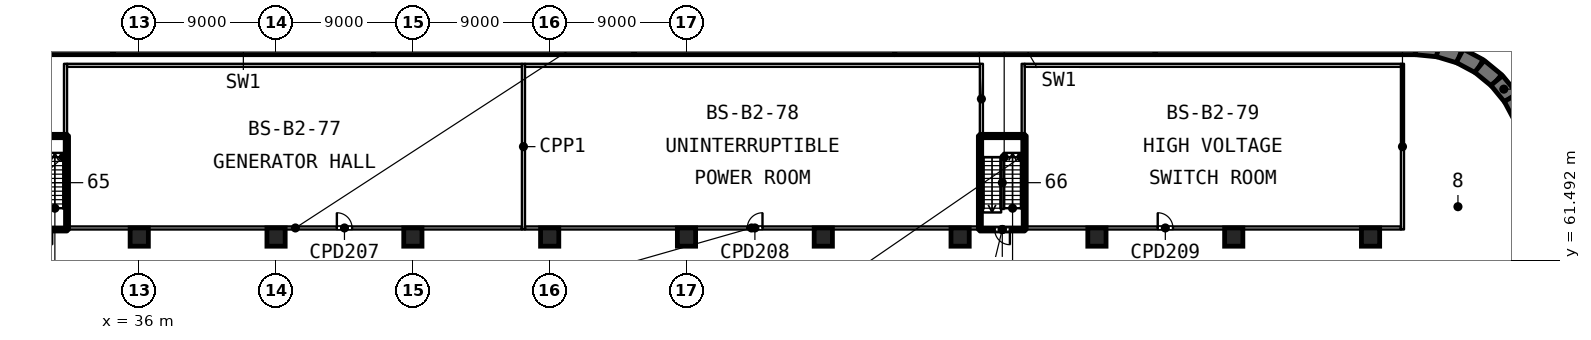
"""IFC4 building model, lengths in metres.
Left out: names, types, materials, properties, quantities, classifications, styles, units other than length and angle.
Written with IfcOpenShell. Run it as: python <this file> out.ifc"""

import sys

from ifc_helpers import new_model, si_unit, direction, frame, frame_2d, origin, origin_2d, place, context, subcontext, project, spatial, rectangle, extrude, element, fill, save


model = new_model("IFC4")
c1 = context("Model", 3, precision=1e-05, world=origin(), true_north=direction((0.0, 1.0)))
c2 = subcontext(c1, "Body", "Model", "MODEL_VIEW")
j1 = project(units=[si_unit("LENGTHUNIT", "METRE"), si_unit("PLANEANGLEUNIT", "RADIAN")], contexts=[c1])
p1 = place(None, origin())
s1 = spatial("IfcSite", under=j1, at=p1, CompositionType="ELEMENT")
p2 = place(p1, origin())
s2 = spatial("IfcBuilding", under=s1, at=p2, CompositionType="ELEMENT")
p3 = place(p2, frame((0.0, 0.0, -9.0)))
s3 = spatial("IfcBuildingStorey", under=s2, at=p3, CompositionType="ELEMENT", Elevation=-9.0)
p4 = place(p3, frame((17.139, 75.5, 0.0), z_axis=(0.0, 0.0, 1.0), x_axis=(1.0, 0.0, 0.0)))
e1 = element("IfcWall", 1, at=p4, inside=s3, PredefinedType="SOLIDWALL", context=c2, shape_type="SweptSolid", body=[
    extrude(rectangle(XDim=17.139, YDim=1.0, at=frame_2d((8.57, 0.0))), origin(), (0.0, 0.0, 1.0), 4.5),
])
p5 = place(p3, frame((34.279, 75.5, 0.0), z_axis=(0.0, 0.0, 1.0), x_axis=(1.0, 0.0, 0.0)))
e2 = element("IfcWall", 2, at=p5, inside=s3, PredefinedType="SOLIDWALL", context=c2, shape_type="SweptSolid", body=[
    extrude(rectangle(XDim=17.139, YDim=1.0, at=frame_2d((8.57, 0.0))), origin(), (0.0, 0.0, 1.0), 4.5),
])
for number, where, z_axis, x_axis in (
    (3, (51.418, 75.5, 0.0), (0.0, 0.0, 1.0), (1.0, 0.0, 0.0)),
    (4, (68.557, 75.5, 0.0), (0.0, 0.0, 1.0), (1.0, 0.0, 0.0)),
    (5, (85.697, 75.5, 0.0), (0.0, 0.0, 1.0), (1.0, 0.0, 0.0)),
):
    element("IfcWall", number, at=place(p3, frame(where, z_axis=z_axis, x_axis=x_axis)), inside=s3, PredefinedType="SOLIDWALL", context=c2, shape_type="SweptSolid", body=[
        extrude(rectangle(XDim=17.139, YDim=1.0, at=frame_2d((8.57, 0.0))), origin(), (0.0, 0.0, 1.0), 4.5),
    ])
p6 = place(p3, frame((102.836, 75.5, 0.0), z_axis=(0.0, 0.0, 1.0), x_axis=(1.0, 0.0, 0.0)))
e6 = element("IfcWall", 6, at=p6, inside=s3, PredefinedType="SOLIDWALL", context=c2, shape_type="SweptSolid", body=[
    extrude(rectangle(XDim=17.139, YDim=1.0, at=frame_2d((8.57, 0.0))), origin(), (0.0, 0.0, 1.0), 4.5),
])
p7 = place(p3, frame((119.975, 75.5, 0.0), z_axis=(0.0, 0.0, 1.0), x_axis=(0.995184880112, -0.098015582414, 0.0)))
e7 = element("IfcWall", 7, at=p7, inside=s3, PredefinedType="SOLIDWALL", context=c2, shape_type="SweptSolid", body=[
    extrude(rectangle(XDim=1.494, YDim=1.0, at=frame_2d((0.747, 0.0))), origin(), (0.0, 0.0, 1.0), 4.5),
])
for number, where, z_axis, x_axis in (
    (8, (121.463, 75.354, 0.0), (0.0, 0.0, 1.0), (0.957, -0.29, 0.0)),
    (9, (122.869, 74.927, 0.0), (0.0, 0.0, 1.0), (0.882, -0.471, 0.0)),
    (10, (124.166, 74.234, 0.0), (0.0, 0.0, 1.0), (0.773, -0.635, 0.0)),
    (11, (125.302, 73.302, 0.0), (0.0, 0.0, 1.0), (0.635, -0.773, 0.0)),
    (12, (126.234, 72.166, 0.0), (0.0, 0.0, 1.0), (0.471, -0.882, 0.0)),
):
    element("IfcWall", number, at=place(p3, frame(where, z_axis=z_axis, x_axis=x_axis)), inside=s3, PredefinedType="SOLIDWALL", context=c2, shape_type="SweptSolid", body=[
        extrude(rectangle(XDim=1.47, YDim=1.0, at=frame_2d((0.735, 0.0))), origin(), (0.0, 0.0, 1.0), 4.5),
    ])
for number, where, z_axis, x_axis in (
    (13, (36.0, 63.0, 0.0), (0.0, 0.0, 1.0), (1.0, 0.0, 0.0)),
    (14, (45.0, 63.0, 0.0), (0.0, 0.0, 1.0), (1.0, 0.0, 0.0)),
    (15, (54.0, 63.0, 0.0), (0.0, 0.0, 1.0), (1.0, 0.0, 0.0)),
    (16, (63.0, 63.0, 0.0), (0.0, 0.0, 1.0), (1.0, 0.0, 0.0)),
    (17, (72.0, 63.0, 0.0), (0.0, 0.0, 1.0), (1.0, 0.0, 0.0)),
    (18, (81.0, 63.0, 0.0), (0.0, 0.0, 1.0), (1.0, 0.0, 0.0)),
    (19, (90.0, 63.0, 0.0), (0.0, 0.0, 1.0), (1.0, 0.0, 0.0)),
    (20, (99.0, 63.0, 0.0), (0.0, 0.0, 1.0), (1.0, 0.0, 0.0)),
    (21, (108.0, 63.0, 0.0), (0.0, 0.0, 1.0), (1.0, 0.0, 0.0)),
    (22, (117.0, 63.0, 0.0), (0.0, 0.0, 1.0), (1.0, 0.0, 0.0)),
):
    element("IfcColumn", number, at=place(p3, frame(where, z_axis=z_axis, x_axis=x_axis)), inside=s3, PredefinedType="COLUMN", context=c2, shape_type="SweptSolid", body=[
        extrude(rectangle(XDim=1.2, YDim=1.2, at=origin_2d()), origin(), (0.0, 0.0, 1.0), 4.5),
    ])
p8 = place(p3, frame((31.15, 69.78, 0.0), z_axis=(0.0, 0.0, 1.0), x_axis=(0.0, 1.0, 0.0)))
e23 = element("IfcWall", 23, at=p8, inside=s3, PredefinedType="PARTITIONING", context=c2, shape_type="SweptSolid", body=[
    extrude(rectangle(XDim=4.62, YDim=0.2, at=frame_2d((2.31, 0.0))), origin(), (0.0, 0.0, 1.0), 4.1),
])
p9 = place(p3, frame((61.275, 63.5, 0.0), z_axis=(0.0, 0.0, 1.0), x_axis=(0.0, 1.0, 0.0)))
e24 = element("IfcWall", 24, at=p9, inside=s3, PredefinedType="PARTITIONING", context=c2, shape_type="SweptSolid", body=[
    extrude(rectangle(XDim=10.9, YDim=0.2, at=frame_2d((5.45, 0.0))), origin(), (0.0, 0.0, 1.0), 4.1),
])
for number, where, z_axis, x_axis in (
    (25, (91.4, 69.78, 0.0), (0.0, 0.0, 1.0), (0.0, 1.0, 0.0)),
    (26, (94.15, 69.78, 0.0), (0.0, 0.0, 1.0), (0.0, 1.0, 0.0)),
):
    element("IfcWall", number, at=place(p3, frame(where, z_axis=z_axis, x_axis=x_axis)), inside=s3, PredefinedType="PARTITIONING", context=c2, shape_type="SweptSolid", body=[
        extrude(rectangle(XDim=4.62, YDim=0.2, at=frame_2d((2.31, 0.0))), origin(), (0.0, 0.0, 1.0), 4.1),
    ])
p10 = place(p3, frame((119.1, 63.5, 0.0), z_axis=(0.0, 0.0, 1.0), x_axis=(0.0, 1.0, 0.0)))
e27 = element("IfcWall", 27, at=p10, inside=s3, PredefinedType="PARTITIONING", context=c2, shape_type="SweptSolid", body=[
    extrude(rectangle(XDim=10.9, YDim=0.2, at=frame_2d((5.45, 0.0))), origin(), (0.0, 0.0, 1.0), 4.1),
])
p11 = place(p3, frame((31.37, 63.6, 0.0), z_axis=(0.0, 0.0, 1.0), x_axis=(1.0, 0.0, 0.0)))
e28 = element("IfcWall", 28, at=p11, inside=s3, PredefinedType="PARTITIONING", context=c2, shape_type="SweptSolid", body=[
    extrude(rectangle(XDim=29.805, YDim=0.2, at=frame_2d((14.902, 0.0))), origin(), (0.0, 0.0, 1.0), 4.1),
])
p12 = place(p11, frame((17.63, 0.0, 0.0)))
e29 = element("IfcOpeningElement", 29, at=p12, cuts=e28, PredefinedType="OPENING", context=c2, shape_type="SweptSolid", body=[
    extrude(rectangle(XDim=1.0, YDim=2.1, at=frame_2d((0.5, 1.05))), frame((0.0, 0.11, 0.0), z_axis=(0.0, -1.0, 0.0), x_axis=(1.0, 0.0, 0.0)), (0.0, 0.0, 1.0), 0.22),
])
p13 = place(p3, frame((61.375, 63.6, 0.0), z_axis=(0.0, 0.0, 1.0), x_axis=(1.0, 0.0, 0.0)))
e30 = element("IfcWall", 30, at=p13, inside=s3, PredefinedType="PARTITIONING", context=c2, shape_type="SweptSolid", body=[
    extrude(rectangle(XDim=29.805, YDim=0.2, at=frame_2d((14.902, 0.0))), origin(), (0.0, 0.0, 1.0), 4.1),
])
p14 = place(p13, frame((14.625, 0.0, 0.0)))
e31 = element("IfcOpeningElement", 31, at=p14, cuts=e30, PredefinedType="OPENING", context=c2, shape_type="SweptSolid", body=[
    extrude(rectangle(XDim=1.0, YDim=2.1, at=frame_2d((0.5, 1.05))), frame((0.0, 0.11, 0.0), z_axis=(0.0, -1.0, 0.0), x_axis=(1.0, 0.0, 0.0)), (0.0, 0.0, 1.0), 0.22),
])
p15 = place(p3, frame((94.37, 63.6, 0.0), z_axis=(0.0, 0.0, 1.0), x_axis=(1.0, 0.0, 0.0)))
e32 = element("IfcWall", 32, at=p15, inside=s3, PredefinedType="PARTITIONING", context=c2, shape_type="SweptSolid", body=[
    extrude(rectangle(XDim=24.63, YDim=0.2, at=frame_2d((12.315, 0.0))), origin(), (0.0, 0.0, 1.0), 4.1),
])
p16 = place(p15, frame((8.63, 0.0, 0.0)))
e33 = element("IfcOpeningElement", 33, at=p16, cuts=e32, PredefinedType="OPENING", context=c2, shape_type="SweptSolid", body=[
    extrude(rectangle(XDim=1.0, YDim=2.1, at=frame_2d((0.5, 1.05))), frame((0.0, 0.11, 0.0), z_axis=(0.0, -1.0, 0.0), x_axis=(1.0, 0.0, 0.0)), (0.0, 0.0, 1.0), 0.22),
])
for number, where, z_axis, x_axis in (
    (34, (31.25, 74.3, 0.0), (0.0, 0.0, 1.0), (1.0, 0.0, 0.0)),
    (35, (61.375, 74.3, 0.0), (0.0, 0.0, 1.0), (1.0, 0.0, 0.0)),
):
    element("IfcWall", number, at=place(p3, frame(where, z_axis=z_axis, x_axis=x_axis)), inside=s3, PredefinedType="PARTITIONING", context=c2, shape_type="SweptSolid", body=[
        extrude(rectangle(XDim=29.925, YDim=0.2, at=frame_2d((14.962, 0.0))), origin(), (0.0, 0.0, 1.0), 4.1),
    ])
p17 = place(p3, frame((94.25, 74.3, 0.0), z_axis=(0.0, 0.0, 1.0), x_axis=(1.0, 0.0, 0.0)))
e36 = element("IfcWall", 36, at=p17, inside=s3, PredefinedType="PARTITIONING", context=c2, shape_type="SweptSolid", body=[
    extrude(rectangle(XDim=24.75, YDim=0.2, at=frame_2d((12.375, 0.0))), origin(), (0.0, 0.0, 1.0), 4.1),
])
p18 = place(p3, frame((31.25, 63.5, 0.0), z_axis=(0.0, 0.0, 1.0), x_axis=(-1.0, 0.0, 0.0)))
e37 = element("IfcWall", 37, at=p18, inside=s3, PredefinedType="SOLIDWALL", context=c2, shape_type="SweptSolid", body=[
    extrude(rectangle(XDim=2.95, YDim=0.2, at=frame_2d((1.475, 0.0))), origin(), (0.0, 0.0, 1.0), 4.1),
])
p19 = place(p18, frame((0.975, 0.0, 0.0)))
e38 = element("IfcOpeningElement", 38, at=p19, cuts=e37, PredefinedType="OPENING", context=c2, shape_type="SweptSolid", body=[
    extrude(rectangle(XDim=1.0, YDim=2.1, at=frame_2d((0.5, 1.05))), frame((0.0, 0.11, 0.0), z_axis=(0.0, -1.0, 0.0), x_axis=(1.0, 0.0, 0.0)), (0.0, 0.0, 1.0), 0.22),
])
p20 = place(p3, frame((28.3, 69.66, 0.0), z_axis=(0.0, 0.0, 1.0), x_axis=(1.0, 0.0, 0.0)))
e39 = element("IfcWall", 39, at=p20, inside=s3, PredefinedType="SOLIDWALL", context=c2, shape_type="SweptSolid", body=[
    extrude(rectangle(XDim=2.95, YDim=0.2, at=frame_2d((1.475, 0.0))), origin(), (0.0, 0.0, 1.0), 4.1),
])
p21 = place(p3, frame((31.25, 69.66, 0.0), z_axis=(0.0, 0.0, 1.0), x_axis=(0.0, -1.0, 0.0)))
e40 = element("IfcWall", 40, at=p21, inside=s3, PredefinedType="SOLIDWALL", context=c2, shape_type="SweptSolid", body=[
    extrude(rectangle(XDim=6.16, YDim=0.2, at=frame_2d((3.08, 0.0))), origin(), (0.0, 0.0, 1.0), 4.1),
])
p22 = place(p3, frame((94.25, 63.5, 0.0), z_axis=(0.0, 0.0, 1.0), x_axis=(-1.0, 0.0, 0.0)))
e41 = element("IfcWall", 41, at=p22, inside=s3, PredefinedType="SOLIDWALL", context=c2, shape_type="SweptSolid", body=[
    extrude(rectangle(XDim=2.95, YDim=0.2, at=frame_2d((1.475, 0.0))), origin(), (0.0, 0.0, 1.0), 4.1),
])
p23 = place(p22, frame((0.975, 0.0, 0.0)))
e42 = element("IfcOpeningElement", 42, at=p23, cuts=e41, PredefinedType="OPENING", context=c2, shape_type="SweptSolid", body=[
    extrude(rectangle(XDim=1.0, YDim=2.1, at=frame_2d((0.5, 1.05))), frame((0.0, 0.11, 0.0), z_axis=(0.0, -1.0, 0.0), x_axis=(1.0, 0.0, 0.0)), (0.0, 0.0, 1.0), 0.22),
])
p24 = place(p3, frame((91.3, 63.5, 0.0), z_axis=(0.0, 0.0, 1.0), x_axis=(0.0, 1.0, 0.0)))
e43 = element("IfcWall", 43, at=p24, inside=s3, PredefinedType="SOLIDWALL", context=c2, shape_type="SweptSolid", body=[
    extrude(rectangle(XDim=6.16, YDim=0.2, at=frame_2d((3.08, 0.0))), origin(), (0.0, 0.0, 1.0), 4.1),
])
p25 = place(p3, frame((91.3, 69.66, 0.0), z_axis=(0.0, 0.0, 1.0), x_axis=(1.0, 0.0, 0.0)))
e44 = element("IfcWall", 44, at=p25, inside=s3, PredefinedType="SOLIDWALL", context=c2, shape_type="SweptSolid", body=[
    extrude(rectangle(XDim=2.95, YDim=0.2, at=frame_2d((1.475, 0.0))), origin(), (0.0, 0.0, 1.0), 4.1),
])
p26 = place(p3, frame((94.25, 69.66, 0.0), z_axis=(0.0, 0.0, 1.0), x_axis=(0.0, -1.0, 0.0)))
e45 = element("IfcWall", 45, at=p26, inside=s3, PredefinedType="SOLIDWALL", context=c2, shape_type="SweptSolid", body=[
    extrude(rectangle(XDim=6.16, YDim=0.2, at=frame_2d((3.08, 0.0))), origin(), (0.0, 0.0, 1.0), 4.1),
])
p27 = place(p12, origin())
e46 = element("IfcDoor", 46, at=p27, inside=s3, OperationType="SINGLE_SWING_LEFT", PredefinedType="DOOR", context=c2, shape_type="SweptSolid", body=[
    extrude(rectangle(XDim=1.0, YDim=2.1, at=frame_2d((0.5, 1.05))), frame((0.0, 0.025, 0.0), z_axis=(0.0, -1.0, 0.0), x_axis=(1.0, 0.0, 0.0)), (0.0, 0.0, 1.0), 0.05),
])
fill(e29, e46)
p28 = place(p14, origin())
e47 = element("IfcDoor", 47, at=p28, inside=s3, OperationType="SINGLE_SWING_RIGHT", PredefinedType="DOOR", context=c2, shape_type="SweptSolid", body=[
    extrude(rectangle(XDim=1.0, YDim=2.1, at=frame_2d((0.5, 1.05))), frame((0.0, 0.025, 0.0), z_axis=(0.0, -1.0, 0.0), x_axis=(1.0, 0.0, 0.0)), (0.0, 0.0, 1.0), 0.05),
])
fill(e31, e47)
p29 = place(p16, origin())
e48 = element("IfcDoor", 48, at=p29, inside=s3, OperationType="SINGLE_SWING_LEFT", PredefinedType="DOOR", context=c2, shape_type="SweptSolid", body=[
    extrude(rectangle(XDim=1.0, YDim=2.1, at=frame_2d((0.5, 1.05))), frame((0.0, 0.025, 0.0), z_axis=(0.0, -1.0, 0.0), x_axis=(1.0, 0.0, 0.0)), (0.0, 0.0, 1.0), 0.05),
])
fill(e33, e48)
p30 = place(p19, origin())
e49 = element("IfcDoor", 49, at=p30, inside=s3, OperationType="SINGLE_SWING_LEFT", PredefinedType="DOOR", context=c2, shape_type="SweptSolid", body=[
    extrude(rectangle(XDim=1.0, YDim=2.1, at=frame_2d((0.5, 1.05))), frame((0.0, 0.025, 0.0), z_axis=(0.0, -1.0, 0.0), x_axis=(1.0, 0.0, 0.0)), (0.0, 0.0, 1.0), 0.05),
])
fill(e38, e49)
p31 = place(p23, origin())
e50 = element("IfcDoor", 50, at=p31, inside=s3, OperationType="SINGLE_SWING_LEFT", PredefinedType="DOOR", context=c2, shape_type="SweptSolid", body=[
    extrude(rectangle(XDim=1.0, YDim=2.1, at=frame_2d((0.5, 1.05))), frame((0.0, 0.025, 0.0), z_axis=(0.0, -1.0, 0.0), x_axis=(1.0, 0.0, 0.0)), (0.0, 0.0, 1.0), 0.05),
])
fill(e42, e50)
save(model, sys.argv[1])
